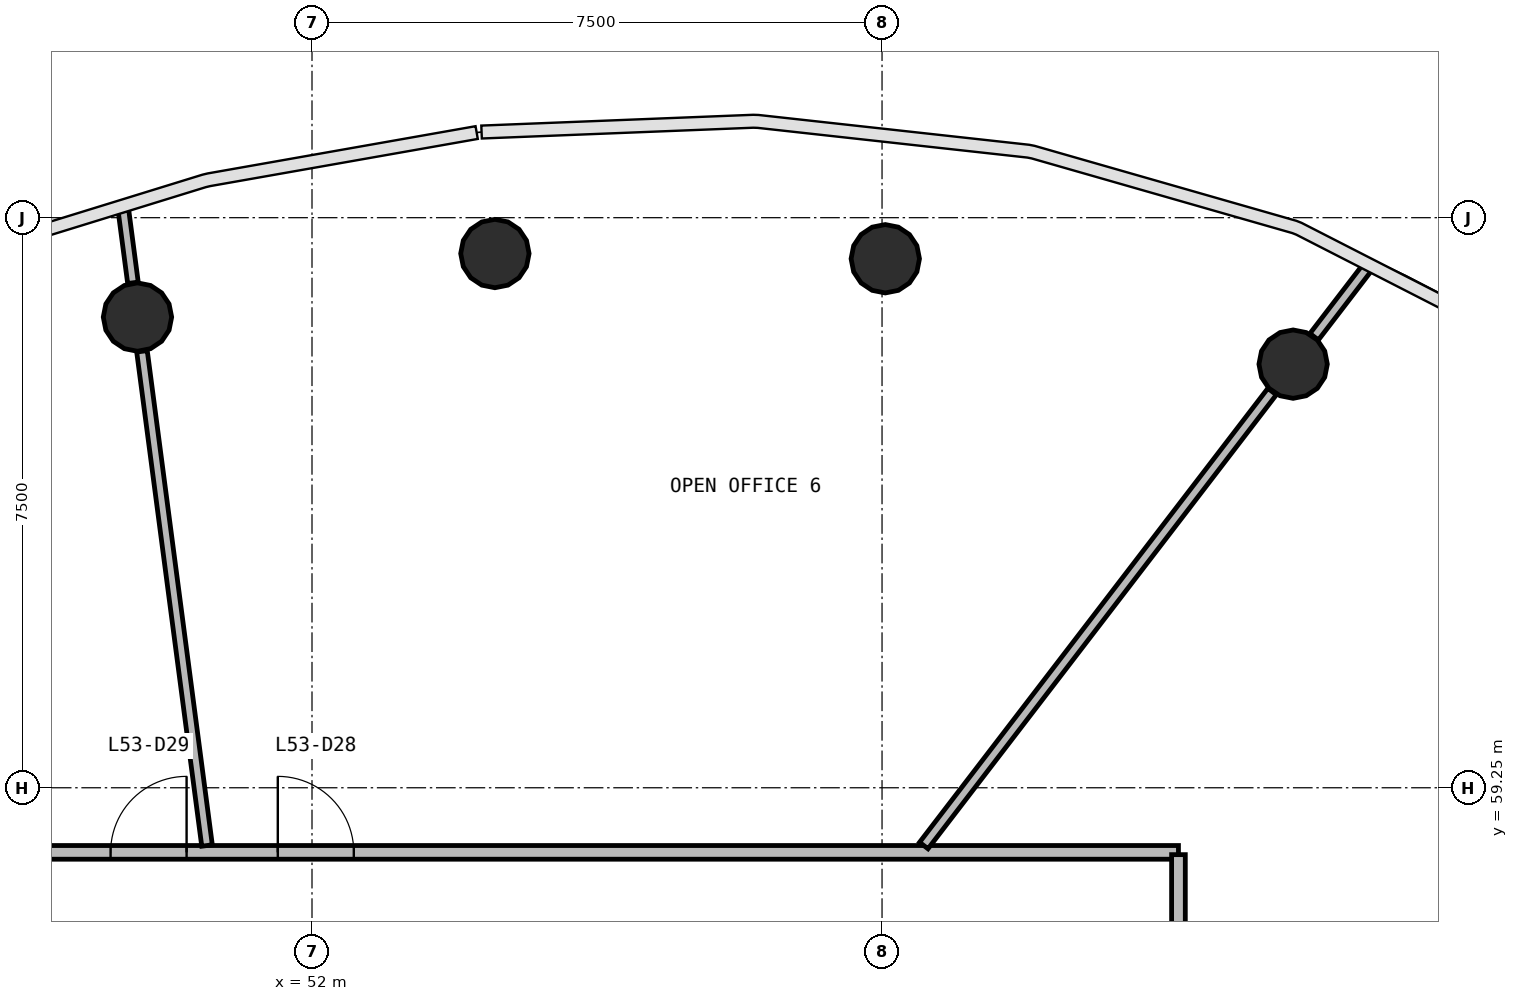
"""IFC4 building model, lengths in metres.
Left out: names, types, materials, properties, quantities, classifications, styles, units other than length and angle.
Written with IfcOpenShell. Run it as: python <this file> out.ifc"""

import sys

from ifc_helpers import new_model, si_unit, direction, frame, frame_2d, origin, origin_2d, place, context, subcontext, project, spatial, rectangle, circle, extrude, source, transform, mapped, element, fill, save


model = new_model("IFC4")
c1 = context("Model", 3, precision=1e-05, world=origin(), true_north=direction((0.0, 1.0)))
c2 = subcontext(c1, "Body", "Model", "MODEL_VIEW")
j1 = project(units=[si_unit("LENGTHUNIT", "METRE"), si_unit("PLANEANGLEUNIT", "RADIAN")], contexts=[c1])
p1 = place(None, origin())
s1 = spatial("IfcSite", under=j1, at=p1, CompositionType="ELEMENT")
p2 = place(p1, origin())
s2 = spatial("IfcBuilding", under=s1, at=p2, CompositionType="ELEMENT")
p3 = place(p2, frame((0.0, 0.0, 218.9)))
s3 = spatial("IfcBuildingStorey", under=s2, at=p3, CompositionType="ELEMENT", Elevation=218.9)
m1 = source(origin(), c2, "Body", "SweptSolid", [
    extrude(circle(Radius=0.45, at=origin_2d()), origin(), (0.0, 0.0, 1.0), 3.9),
])
for number, where, z_axis, x_axis in (
    (1, (64.909, 64.823, 0.0), (0.0, 0.0, 1.0), (1.0, 0.0, 0.0)),
    (2, (59.543, 66.21, 0.0), (0.0, 0.0, 1.0), (1.0, 0.0, 0.0)),
    (3, (54.406, 66.278, 0.0), (0.0, 0.0, 1.0), (1.0, 0.0, 0.0)),
    (4, (49.704, 65.442, 0.0), (0.0, 0.0, 1.0), (1.0, 0.0, 0.0)),
):
    element("IfcColumn", number, at=place(p3, frame(where, z_axis=z_axis, x_axis=x_axis)), inside=s3, PredefinedType="COLUMN", context=c2, shape_type="MappedRepresentation", body=[
        mapped(m1, transform((0.0, 0.0, 0.0), scale=1.0)),
    ])
p4 = place(p3, frame((40.6, 58.4, 0.0), z_axis=(0.0, 0.0, 1.0), x_axis=(1.0, 0.0, 0.0)))
e5 = element("IfcWall", 5, at=p4, inside=s3, PredefinedType="PARTITIONING", context=c2, shape_type="SweptSolid", body=[
    extrude(rectangle(XDim=22.8, YDim=0.18, at=frame_2d((11.4, 0.0))), origin(), (0.0, 0.0, 1.0), 2.88),
])
p5 = place(p4, frame((10.95, 0.0, 0.0)))
e6 = element("IfcOpeningElement", 6, at=p5, cuts=e5, PredefinedType="OPENING", context=c2, shape_type="SweptSolid", body=[
    extrude(rectangle(XDim=1.0, YDim=2.1, at=frame_2d((0.5, 1.05))), frame((0.0, 0.1, 0.0), z_axis=(0.0, -1.0, 0.0), x_axis=(1.0, 0.0, 0.0)), (0.0, 0.0, 1.0), 0.2),
])
p6 = place(p4, frame((8.75, 0.0, 0.0)))
e7 = element("IfcOpeningElement", 7, at=p6, cuts=e5, PredefinedType="OPENING", context=c2, shape_type="SweptSolid", body=[
    extrude(rectangle(XDim=1.0, YDim=2.1, at=frame_2d((0.5, 1.05))), frame((0.0, 0.1, 0.0), z_axis=(0.0, -1.0, 0.0), x_axis=(1.0, 0.0, 0.0)), (0.0, 0.0, 1.0), 0.2),
])
p7 = place(p3, frame((63.4, 58.37, 0.0), z_axis=(0.0, 0.0, 1.0), x_axis=(0.0, -1.0, 0.0)))
e8 = element("IfcWall", 8, at=p7, inside=s3, PredefinedType="PARTITIONING", context=c2, shape_type="SweptSolid", body=[
    extrude(rectangle(XDim=20.74, YDim=0.18, at=frame_2d((10.37, 0.0))), origin(), (0.0, 0.0, 1.0), 2.88),
])
p8 = place(p7, frame((12.09, 0.0, 0.0)))
e9 = element("IfcOpeningElement", 9, at=p8, cuts=e8, PredefinedType="OPENING", context=c2, shape_type="SweptSolid", body=[
    extrude(rectangle(XDim=1.0, YDim=2.1, at=frame_2d((0.5, 1.05))), frame((0.0, 0.1, 0.0), z_axis=(0.0, -1.0, 0.0), x_axis=(1.0, 0.0, 0.0)), (0.0, 0.0, 1.0), 0.2),
])
p9 = place(p7, frame((9.89, 0.0, 0.0)))
e10 = element("IfcOpeningElement", 10, at=p9, cuts=e8, PredefinedType="OPENING", context=c2, shape_type="SweptSolid", body=[
    extrude(rectangle(XDim=1.0, YDim=2.1, at=frame_2d((0.5, 1.05))), frame((0.0, 0.1, 0.0), z_axis=(0.0, -1.0, 0.0), x_axis=(1.0, 0.0, 0.0)), (0.0, 0.0, 1.0), 0.2),
])
p10 = place(p3, frame((60.049, 58.49, 0.0), z_axis=(0.0, 0.0, 1.0), x_axis=(0.608758977351, 0.793355221508, 0.0)))
e11 = element("IfcWall", 11, at=p10, inside=s3, PredefinedType="PARTITIONING", context=c2, shape_type="SweptSolid", body=[
    extrude(rectangle(XDim=7.528, YDim=0.14, at=frame_2d((3.764, 0.0))), origin(), (0.0, 0.0, 1.0), 2.88),
])
p11 = place(p3, frame((50.619, 58.49, 0.0), z_axis=(0.0, 0.0, 1.0), x_axis=(-0.130519996386, 0.991445677051, 0.0)))
e12 = element("IfcWall", 12, at=p11, inside=s3, PredefinedType="PARTITIONING", context=c2, shape_type="SweptSolid", body=[
    extrude(rectangle(XDim=6.558, YDim=0.14, at=frame_2d((3.279, 0.0))), origin(), (0.0, 0.0, 1.0), 2.88),
])
p12 = place(p3, frame((65.186, 65.184, 0.0), z_axis=(0.0, 0.0, 1.0), x_axis=(0.608692390952, 0.793406310283, 0.0)))
e13 = element("IfcWall", 13, at=p12, inside=s3, PredefinedType="PARTITIONING", context=c2, shape_type="SweptSolid", body=[
    extrude(rectangle(XDim=1.159, YDim=0.14, at=frame_2d((0.58, 0.0))), origin(), (0.0, 0.0, 1.0), 2.88),
])
p13 = place(p3, frame((49.644, 65.893, 0.0), z_axis=(0.0, 0.0, 1.0), x_axis=(-0.130507364932, 0.991447339852, 0.0)))
e14 = element("IfcWall", 14, at=p13, inside=s3, PredefinedType="PARTITIONING", context=c2, shape_type="SweptSolid", body=[
    extrude(rectangle(XDim=0.956, YDim=0.14, at=frame_2d((0.478, 0.0))), origin(), (0.0, 0.0, 1.0), 2.88),
])
m2 = source(origin(), c2, "Body", "SweptSolid", [
    extrude(rectangle(XDim=1.0, YDim=2.1, at=frame_2d((0.5, 1.05))), frame((0.0, 0.025, 0.0), z_axis=(0.0, -1.0, 0.0), x_axis=(1.0, 0.0, 0.0)), (0.0, 0.0, 1.0), 0.05),
])
p14 = place(p5, origin())
e15 = element("IfcDoor", 15, at=p14, inside=s3, OperationType="SINGLE_SWING_LEFT", PredefinedType="DOOR", context=c2, shape_type="MappedRepresentation", body=[
    mapped(m2, transform((0.0, 0.0, 0.0), scale=1.0)),
])
fill(e6, e15)
p15 = place(p6, origin())
e16 = element("IfcDoor", 16, at=p15, inside=s3, OperationType="SINGLE_SWING_RIGHT", PredefinedType="DOOR", context=c2, shape_type="MappedRepresentation", body=[
    mapped(m2, transform((0.0, 0.0, 0.0), scale=1.0)),
])
fill(e7, e16)
save(model, sys.argv[1])
